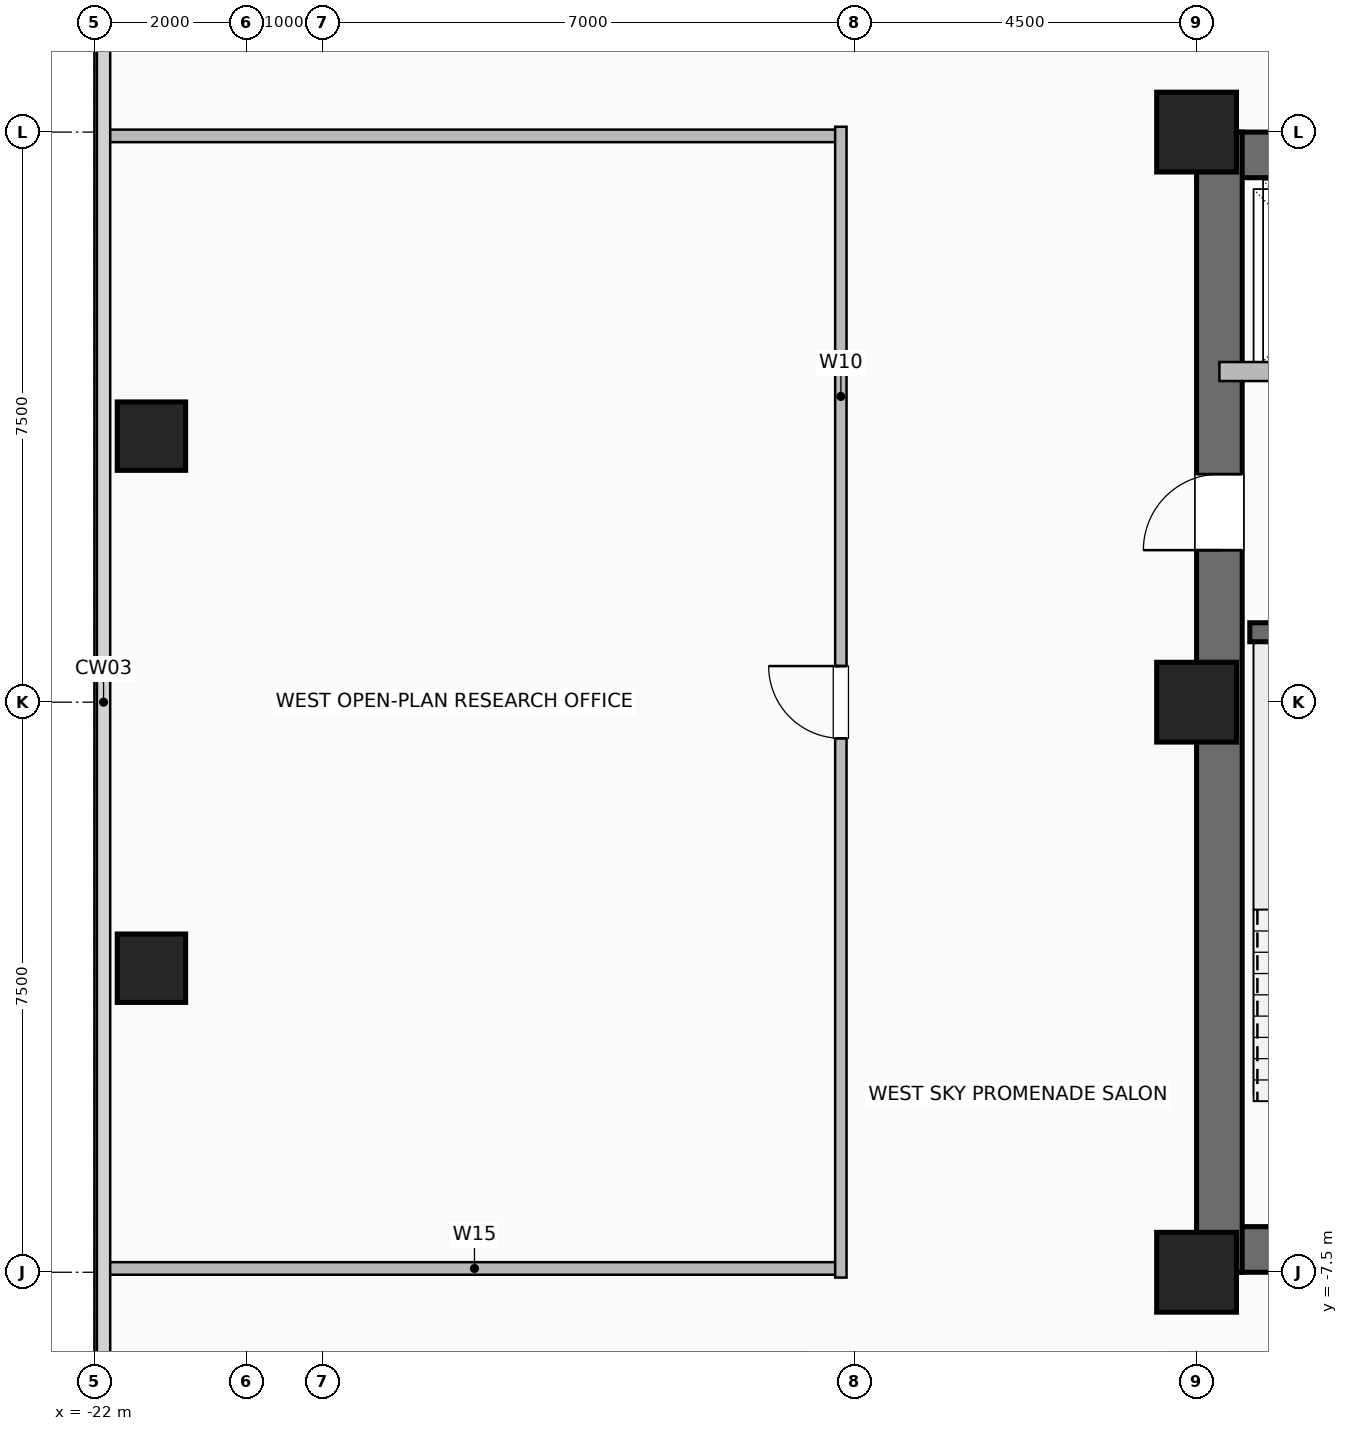
"""IFC4 building model, lengths in metres.
Left out: names, types, materials, properties, quantities, classifications, styles, units other than length and angle.
Written with IfcOpenShell. Run it as: python <this file> out.ifc"""

import sys

from ifc_helpers import new_model, si_unit, direction, frame, frame_2d, origin, origin_2d, place, context, subcontext, project, spatial, rectangle, hollow_rectangle, extrude, element, fill, save


model = new_model("IFC4")
c1 = context("Model", 3, precision=1e-05, world=origin(), true_north=direction((0.0, 1.0)))
c2 = subcontext(c1, "Body", "Model", "MODEL_VIEW")
j1 = project(units=[si_unit("LENGTHUNIT", "METRE"), si_unit("PLANEANGLEUNIT", "RADIAN")], contexts=[c1])
p1 = place(None, origin())
s1 = spatial("IfcSite", under=j1, at=p1, CompositionType="ELEMENT")
p2 = place(p1, origin())
s2 = spatial("IfcBuilding", under=s1, at=p2, CompositionType="ELEMENT")
p3 = place(p2, frame((0.0, 0.0, 112.0)))
s3 = spatial("IfcBuildingStorey", under=s2, at=p3, CompositionType="ELEMENT", Elevation=112.0)
for number, where, z_axis, x_axis in (
    (1, (-7.5, -7.5, 0.0), (0.0, 0.0, 1.0), (1.0, 0.0, 0.0)),
    (2, (-7.5, 7.5, 0.0), (0.0, 0.0, 1.0), (1.0, 0.0, 0.0)),
    (3, (-7.5, 0.0, 0.0), (0.0, 0.0, 1.0), (1.0, 0.0, 0.0)),
):
    element("IfcColumn", number, at=place(p3, frame(where, z_axis=z_axis, x_axis=x_axis)), inside=s3, PredefinedType="COLUMN", context=c2, shape_type="SweptSolid", body=[
        extrude(hollow_rectangle(XDim=1.05, YDim=1.05, WallThickness=0.05, at=origin_2d()), origin(), (0.0, 0.0, 1.0), 3.6),
    ])
for number, where, z_axis, x_axis in (
    (4, (-21.25, -3.5, 0.0), (0.0, 0.0, 1.0), (1.0, 0.0, 0.0)),
    (5, (-21.25, 3.5, 0.0), (0.0, 0.0, 1.0), (1.0, 0.0, 0.0)),
):
    element("IfcColumn", number, at=place(p3, frame(where, z_axis=z_axis, x_axis=x_axis)), inside=s3, PredefinedType="COLUMN", context=c2, shape_type="SweptSolid", body=[
        extrude(hollow_rectangle(XDim=0.9, YDim=0.9, WallThickness=0.045, at=origin_2d()), origin(), (0.0, 0.0, 1.0), 3.6),
    ])
p4 = place(p3, frame((-7.5, -7.2, 0.0), z_axis=(0.0, 0.0, 1.0), x_axis=(1.0, 0.0, 0.0)))
e6 = element("IfcWall", 6, at=p4, inside=s3, PredefinedType="SHEAR", context=c2, shape_type="SweptSolid", body=[
    extrude(rectangle(XDim=15.0, YDim=0.6, at=frame_2d((7.5, 0.0))), origin(), (0.0, 0.0, 1.0), 3.36),
])
p5 = place(p4, frame((1.55, 0.0, 0.0)))
e7 = element("IfcOpeningElement", 7, at=p5, cuts=e6, PredefinedType="OPENING", context=c2, shape_type="SweptSolid", body=[
    extrude(rectangle(XDim=1.05, YDim=2.08, at=frame_2d((0.525, 1.04))), frame((0.0, 0.31, 0.0), z_axis=(0.0, -1.0, 0.0), x_axis=(1.0, 0.0, 0.0)), (0.0, 0.0, 1.0), 0.62),
])
p6 = place(p4, frame((12.4, 0.0, 0.0)))
e8 = element("IfcOpeningElement", 8, at=p6, cuts=e6, PredefinedType="OPENING", context=c2, shape_type="SweptSolid", body=[
    extrude(rectangle(XDim=1.05, YDim=2.08, at=frame_2d((0.525, 1.04))), frame((0.0, 0.31, 0.0), z_axis=(0.0, -1.0, 0.0), x_axis=(1.0, 0.0, 0.0)), (0.0, 0.0, 1.0), 0.62),
])
p7 = place(p4, frame((5.2, 0.0, 0.0)))
e9 = element("IfcOpeningElement", 9, at=p7, cuts=e6, PredefinedType="OPENING", context=c2, shape_type="SweptSolid", body=[
    extrude(rectangle(XDim=1.0, YDim=2.08, at=frame_2d((0.5, 1.04))), frame((0.0, 0.31, 0.0), z_axis=(0.0, -1.0, 0.0), x_axis=(1.0, 0.0, 0.0)), (0.0, 0.0, 1.0), 0.62),
])
p8 = place(p4, frame((8.65, 0.0, 0.0)))
e10 = element("IfcOpeningElement", 10, at=p8, cuts=e6, PredefinedType="OPENING", context=c2, shape_type="SweptSolid", body=[
    extrude(rectangle(XDim=1.0, YDim=2.08, at=frame_2d((0.5, 1.04))), frame((0.0, 0.31, 0.0), z_axis=(0.0, -1.0, 0.0), x_axis=(1.0, 0.0, 0.0)), (0.0, 0.0, 1.0), 0.62),
])
p9 = place(p3, frame((-7.5, 7.2, 0.0), z_axis=(0.0, 0.0, 1.0), x_axis=(1.0, 0.0, 0.0)))
e11 = element("IfcWall", 11, at=p9, inside=s3, PredefinedType="SHEAR", context=c2, shape_type="SweptSolid", body=[
    extrude(rectangle(XDim=15.0, YDim=0.6, at=frame_2d((7.5, 0.0))), origin(), (0.0, 0.0, 1.0), 3.36),
])
p10 = place(p3, frame((-7.2, -7.5, 0.0), z_axis=(0.0, 0.0, 1.0), x_axis=(0.0, 1.0, 0.0)))
e12 = element("IfcWall", 12, at=p10, inside=s3, PredefinedType="SHEAR", context=c2, shape_type="SweptSolid", body=[
    extrude(rectangle(XDim=15.0, YDim=0.6, at=frame_2d((7.5, 0.0))), origin(), (0.0, 0.0, 1.0), 3.36),
])
p11 = place(p10, frame((9.5, 0.0, 0.0)))
e13 = element("IfcOpeningElement", 13, at=p11, cuts=e12, PredefinedType="OPENING", context=c2, shape_type="SweptSolid", body=[
    extrude(rectangle(XDim=1.0, YDim=2.08, at=frame_2d((0.5, 1.04))), frame((0.0, 0.31, 0.0), z_axis=(0.0, -1.0, 0.0), x_axis=(1.0, 0.0, 0.0)), (0.0, 0.0, 1.0), 0.62),
])
p12 = place(p3, frame((-6.8, 0.92, 0.0), z_axis=(0.0, 0.0, 1.0), x_axis=(1.0, 0.0, 0.0)))
e14 = element("IfcWall", 14, at=p12, inside=s3, PredefinedType="SHEAR", context=c2, shape_type="SweptSolid", body=[
    extrude(rectangle(XDim=3.33, YDim=0.25, at=frame_2d((1.665, 0.0))), origin(), (0.0, 0.0, 1.0), 3.36),
])
p13 = place(p3, frame((-7.2, 4.35, 0.0), z_axis=(0.0, 0.0, 1.0), x_axis=(1.0, 0.0, 0.0)))
e15 = element("IfcWall", 15, at=p13, inside=s3, PredefinedType="SHEAR", context=c2, shape_type="SweptSolid", body=[
    extrude(rectangle(XDim=2.7, YDim=0.25, at=frame_2d((1.35, 0.0))), origin(), (0.0, 0.0, 1.0), 3.36),
])
p14 = place(p13, frame((0.75, 0.0, 0.0)))
e16 = element("IfcOpeningElement", 16, at=p14, cuts=e15, PredefinedType="OPENING", context=c2, shape_type="SweptSolid", body=[
    extrude(rectangle(XDim=1.2, YDim=2.2, at=frame_2d((0.6, 1.1))), frame((0.0, 0.135, 0.0), z_axis=(0.0, -1.0, 0.0), x_axis=(1.0, 0.0, 0.0)), (0.0, 0.0, 1.0), 0.27),
])
for number, where, z_axis, x_axis in (
    (17, (-21.82, -7.45, 0.0), (0.0, 0.0, 1.0), (1.0, 0.0, 0.0)),
    (18, (-21.82, 7.45, 0.0), (0.0, 0.0, 1.0), (1.0, 0.0, 0.0)),
):
    element("IfcWall", number, at=place(p3, frame(where, z_axis=z_axis, x_axis=x_axis)), inside=s3, PredefinedType="PLUMBINGWALL", context=c2, shape_type="SweptSolid", body=[
        extrude(rectangle(XDim=9.64, YDim=0.165, at=frame_2d((4.82, 0.0))), origin(), (0.0, 0.0, 1.0), 3.36),
    ])
p15 = place(p3, frame((-12.18, -7.57, 0.0), z_axis=(0.0, 0.0, 1.0), x_axis=(0.0, 1.0, 0.0)))
e19 = element("IfcWall", 19, at=p15, inside=s3, PredefinedType="PARTITIONING", context=c2, shape_type="SweptSolid", body=[
    extrude(rectangle(XDim=15.14, YDim=0.15, at=frame_2d((7.57, 0.0))), origin(), (0.0, 0.0, 1.0), 3.36),
])
p16 = place(p15, frame((7.095, 0.0, 0.0)))
e20 = element("IfcOpeningElement", 20, at=p16, cuts=e19, PredefinedType="OPENING", context=c2, shape_type="SweptSolid", body=[
    extrude(rectangle(XDim=0.95, YDim=2.06, at=frame_2d((0.475, 1.03))), frame((0.0, 0.085, 0.0), z_axis=(0.0, -1.0, 0.0), x_axis=(1.0, 0.0, 0.0)), (0.0, 0.0, 1.0), 0.17),
])
p17 = place(p11, origin())
e21 = element("IfcDoor", 21, at=p17, inside=s3, OperationType="SINGLE_SWING_LEFT", PredefinedType="DOOR", context=c2, shape_type="SweptSolid", body=[
    extrude(rectangle(XDim=1.0, YDim=2.08, at=frame_2d((0.5, 1.04))), frame((0.0, 0.025, 0.0), z_axis=(0.0, -1.0, 0.0), x_axis=(1.0, 0.0, 0.0)), (0.0, 0.0, 1.0), 0.05),
])
fill(e13, e21)
p18 = place(p16, origin())
e22 = element("IfcDoor", 22, at=p18, inside=s3, OperationType="SINGLE_SWING_RIGHT", PredefinedType="DOOR", context=c2, shape_type="SweptSolid", body=[
    extrude(rectangle(XDim=0.95, YDim=2.06, at=frame_2d((0.475, 1.03))), frame((0.0, 0.025, 0.0), z_axis=(0.0, -1.0, 0.0), x_axis=(1.0, 0.0, 0.0)), (0.0, 0.0, 1.0), 0.05),
])
fill(e20, e22)
save(model, sys.argv[1])
